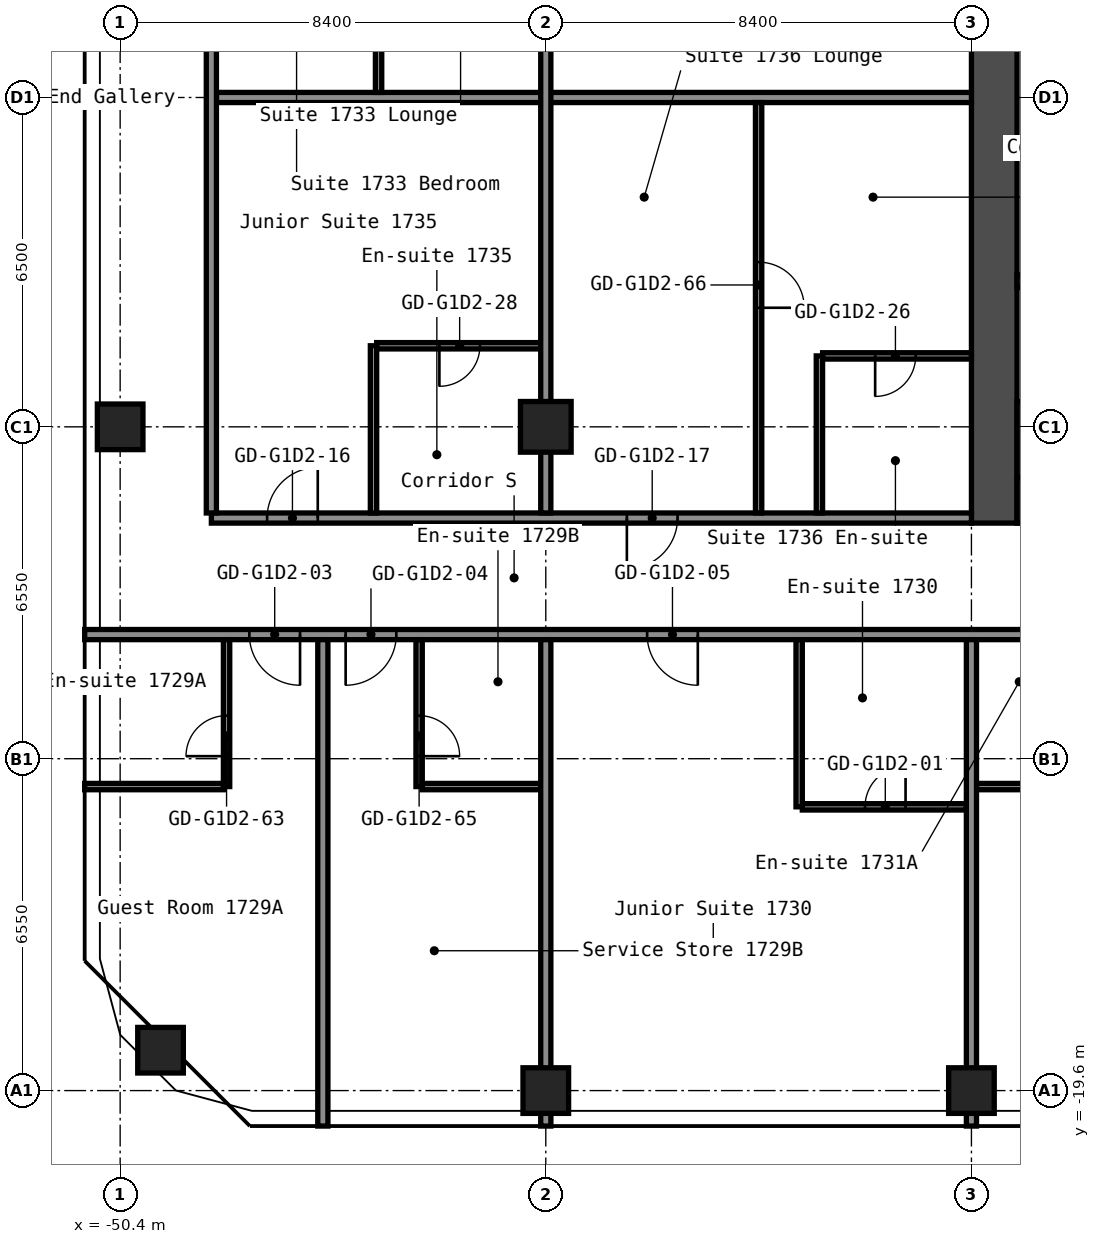
"""IFC4 building model, lengths in metres.
Left out: names, types, materials, properties, quantities, classifications, styles, units other than length and angle.
Written with IfcOpenShell. Run it as: python <this file> out.ifc"""

import sys

from ifc_helpers import new_model, si_unit, direction, frame, frame_2d, origin, origin_2d, place, context, subcontext, project, spatial, rectangle, hollow_rectangle, extrude, element, fill, save


model = new_model("IFC4")
c1 = context("Model", 3, precision=1e-05, world=origin(), true_north=direction((0.0, 1.0)))
c2 = subcontext(c1, "Body", "Model", "MODEL_VIEW")
j1 = project(units=[si_unit("LENGTHUNIT", "METRE"), si_unit("PLANEANGLEUNIT", "RADIAN")], contexts=[c1])
p1 = place(None, origin())
s1 = spatial("IfcSite", under=j1, at=p1, CompositionType="ELEMENT")
p2 = place(p1, origin())
s2 = spatial("IfcBuilding", under=s1, at=p2, CompositionType="ELEMENT")
p3 = place(p2, frame((0.0, 0.0, 61.4)))
s3 = spatial("IfcBuildingStorey", under=s2, at=p3, CompositionType="ELEMENT", Elevation=61.4)
for number, where, z_axis, x_axis in (
    (1, (-49.603, -18.803, 0.0), (0.0, 0.0, 1.0), (1.0, 0.0, 0.0)),
    (2, (-50.4, -6.5, 0.0), (0.0, 0.0, 1.0), (1.0, 0.0, 0.0)),
    (3, (-42.0, -19.6, 0.0), (0.0, 0.0, 1.0), (1.0, 0.0, 0.0)),
):
    element("IfcColumn", number, at=place(p3, frame(where, z_axis=z_axis, x_axis=x_axis)), inside=s3, PredefinedType="COLUMN", context=c2, shape_type="SweptSolid", body=[
        extrude(hollow_rectangle(XDim=0.9, YDim=0.9, WallThickness=0.036, at=origin_2d()), origin(), (0.0, 0.0, 1.0), 2.9),
    ])
p4 = place(p3, frame((-42.0, -6.5, 0.0), z_axis=(0.0, 0.0, 1.0), x_axis=(1.0, 0.0, 0.0)))
e4 = element("IfcColumn", 4, at=p4, inside=s3, PredefinedType="COLUMN", context=c2, shape_type="SweptSolid", body=[
    extrude(hollow_rectangle(XDim=1.0, YDim=1.0, WallThickness=0.04, at=origin_2d()), origin(), (0.0, 0.0, 1.0), 2.9),
])
p5 = place(p3, frame((-33.6, -19.6, 0.0), z_axis=(0.0, 0.0, 1.0), x_axis=(1.0, 0.0, 0.0)))
e5 = element("IfcColumn", 5, at=p5, inside=s3, PredefinedType="COLUMN", context=c2, shape_type="SweptSolid", body=[
    extrude(hollow_rectangle(XDim=0.9, YDim=0.9, WallThickness=0.036, at=origin_2d()), origin(), (0.0, 0.0, 1.0), 2.9),
])
p6 = place(p3, frame((-33.15, -8.4, 0.0), z_axis=(0.0, 0.0, 1.0), x_axis=(0.0, 1.0, 0.0)))
e6 = element("IfcWall", 6, at=p6, inside=s3, PredefinedType="SHEAR", context=c2, shape_type="SweptSolid", body=[
    extrude(rectangle(XDim=16.8, YDim=0.9, at=frame_2d((8.4, 0.0))), origin(), (0.0, 0.0, 1.0), 2.9),
])
p7 = place(p3, frame((-32.7, -7.95, 0.0), z_axis=(0.0, 0.0, 1.0), x_axis=(1.0, 0.0, 0.0)))
e7 = element("IfcWall", 7, at=p7, inside=s3, PredefinedType="SHEAR", context=c2, shape_type="SweptSolid", body=[
    extrude(rectangle(XDim=15.0, YDim=0.9, at=frame_2d((7.5, 0.0))), origin(), (0.0, 0.0, 1.0), 2.9),
])
p8 = place(p7, frame((11.45, 0.0, 0.0)))
e8 = element("IfcOpeningElement", 8, at=p8, cuts=e7, PredefinedType="OPENING", context=c2, shape_type="SweptSolid", body=[
    extrude(rectangle(XDim=1.0, YDim=2.1, at=frame_2d((0.5, 1.05))), frame((0.0, 0.46, 0.0), z_axis=(0.0, -1.0, 0.0), x_axis=(1.0, 0.0, 0.0)), (0.0, 0.0, 1.0), 0.92),
])
p9 = place(p3, frame((-32.7, -3.625, 0.0), z_axis=(0.0, 0.0, 1.0), x_axis=(1.0, 0.0, 0.0)))
e9 = element("IfcWall", 9, at=p9, inside=s3, PredefinedType="SHEAR", context=c2, shape_type="SweptSolid", body=[
    extrude(rectangle(XDim=4.55, YDim=0.25, at=frame_2d((2.275, 0.0))), origin(), (0.0, 0.0, 1.0), 2.9),
])
p10 = place(p9, frame((2.85, 0.0, 0.0)))
e10 = element("IfcOpeningElement", 10, at=p10, cuts=e9, PredefinedType="OPENING", context=c2, shape_type="SweptSolid", body=[
    extrude(rectangle(XDim=1.1, YDim=2.1, at=frame_2d((0.55, 1.05))), frame((0.0, 0.135, 0.0), z_axis=(0.0, -1.0, 0.0), x_axis=(1.0, 0.0, 0.0)), (0.0, 0.0, 1.0), 0.27),
])
p11 = place(p9, frame((0.6, 0.0, 0.0)))
e11 = element("IfcOpeningElement", 11, at=p11, cuts=e9, PredefinedType="OPENING", context=c2, shape_type="SweptSolid", body=[
    extrude(rectangle(XDim=1.1, YDim=2.1, at=frame_2d((0.55, 1.05))), frame((0.0, 0.135, 0.0), z_axis=(0.0, -1.0, 0.0), x_axis=(1.0, 0.0, 0.0)), (0.0, 0.0, 1.0), 0.27),
])
p12 = place(p3, frame((-32.7, -6.75, 0.0), z_axis=(0.0, 0.0, 1.0), x_axis=(1.0, 0.0, 0.0)))
e12 = element("IfcWall", 12, at=p12, inside=s3, PredefinedType="SHEAR", context=c2, shape_type="SweptSolid", body=[
    extrude(rectangle(XDim=4.55, YDim=1.5, at=frame_2d((2.275, 0.0))), origin(), (0.0, 0.0, 1.0), 2.9),
])
p13 = place(p3, frame((-36.938, -14.0, 0.0), z_axis=(0.0, 0.0, 1.0), x_axis=(1.0, 0.0, 0.0)))
e13 = element("IfcWall", 13, at=p13, inside=s3, PredefinedType="PARTITIONING", context=c2, shape_type="SweptSolid", body=[
    extrude(rectangle(XDim=3.238, YDim=0.125, at=frame_2d((1.619, 0.0))), origin(), (0.0, 0.0, 1.0), 2.9),
])
p14 = place(p13, frame((1.238, 0.0, 0.0)))
e14 = element("IfcOpeningElement", 14, at=p14, cuts=e13, PredefinedType="OPENING", context=c2, shape_type="SweptSolid", body=[
    extrude(rectangle(XDim=0.8, YDim=2.1, at=frame_2d((0.4, 1.05))), frame((0.0, 0.073, 0.0), z_axis=(0.0, -1.0, 0.0), x_axis=(1.0, 0.0, 0.0)), (0.0, 0.0, 1.0), 0.145),
])
p15 = place(p3, frame((-51.1, -13.6, 0.0), z_axis=(0.0, 0.0, 1.0), x_axis=(1.0, 0.0, 0.0)))
e15 = element("IfcWall", 15, at=p15, inside=s3, PredefinedType="PARTITIONING", context=c2, shape_type="SweptSolid", body=[
    extrude(rectangle(XDim=2.738, YDim=0.125, at=frame_2d((1.369, 0.0))), origin(), (0.0, 0.0, 1.0), 2.9),
])
for number, where, z_axis, x_axis in (
    (16, (-44.438, -13.6, 0.0), (0.0, 0.0, 1.0), (1.0, 0.0, 0.0)),
    (17, (-33.5, -13.6, 0.0), (0.0, 0.0, 1.0), (1.0, 0.0, 0.0)),
):
    element("IfcWall", number, at=place(p3, frame(where, z_axis=z_axis, x_axis=x_axis)), inside=s3, PredefinedType="PARTITIONING", context=c2, shape_type="SweptSolid", body=[
        extrude(rectangle(XDim=2.337, YDim=0.125, at=frame_2d((1.169, 0.0))), origin(), (0.0, 0.0, 1.0), 2.9),
    ])
p16 = place(p3, frame((-51.1, -10.6, 0.0), z_axis=(0.0, 0.0, 1.0), x_axis=(1.0, 0.0, 0.0)))
e18 = element("IfcWall", 18, at=p16, inside=s3, PredefinedType="PARTITIONING", context=c2, shape_type="SweptSolid", body=[
    extrude(rectangle(XDim=34.3, YDim=0.2, at=frame_2d((17.15, 0.0))), origin(), (0.0, 0.0, 1.0), 2.9),
])
p17 = place(p16, frame((3.25, 0.0, 0.0)))
e19 = element("IfcOpeningElement", 19, at=p17, cuts=e18, PredefinedType="OPENING", context=c2, shape_type="SweptSolid", body=[
    extrude(rectangle(XDim=1.0, YDim=2.1, at=frame_2d((0.5, 1.05))), frame((0.0, 0.11, 0.0), z_axis=(0.0, -1.0, 0.0), x_axis=(1.0, 0.0, 0.0)), (0.0, 0.0, 1.0), 0.22),
])
p18 = place(p16, frame((5.15, 0.0, 0.0)))
e20 = element("IfcOpeningElement", 20, at=p18, cuts=e18, PredefinedType="OPENING", context=c2, shape_type="SweptSolid", body=[
    extrude(rectangle(XDim=1.0, YDim=2.1, at=frame_2d((0.5, 1.05))), frame((0.0, 0.11, 0.0), z_axis=(0.0, -1.0, 0.0), x_axis=(1.0, 0.0, 0.0)), (0.0, 0.0, 1.0), 0.22),
])
p19 = place(p16, frame((11.1, 0.0, 0.0)))
e21 = element("IfcOpeningElement", 21, at=p19, cuts=e18, PredefinedType="OPENING", context=c2, shape_type="SweptSolid", body=[
    extrude(rectangle(XDim=1.0, YDim=2.1, at=frame_2d((0.5, 1.05))), frame((0.0, 0.11, 0.0), z_axis=(0.0, -1.0, 0.0), x_axis=(1.0, 0.0, 0.0)), (0.0, 0.0, 1.0), 0.22),
])
p20 = place(p16, frame((20.35, 0.0, 0.0)))
e22 = element("IfcOpeningElement", 22, at=p20, cuts=e18, PredefinedType="OPENING", context=c2, shape_type="SweptSolid", body=[
    extrude(rectangle(XDim=1.0, YDim=2.1, at=frame_2d((0.5, 1.05))), frame((0.0, 0.11, 0.0), z_axis=(0.0, -1.0, 0.0), x_axis=(1.0, 0.0, 0.0)), (0.0, 0.0, 1.0), 0.22),
])
p21 = place(p16, frame((22.05, 0.0, 0.0)))
e23 = element("IfcOpeningElement", 23, at=p21, cuts=e18, PredefinedType="OPENING", context=c2, shape_type="SweptSolid", body=[
    extrude(rectangle(XDim=1.0, YDim=2.1, at=frame_2d((0.5, 1.05))), frame((0.0, 0.11, 0.0), z_axis=(0.0, -1.0, 0.0), x_axis=(1.0, 0.0, 0.0)), (0.0, 0.0, 1.0), 0.22),
])
p22 = place(p16, frame((31.3, 0.0, 0.0)))
e24 = element("IfcOpeningElement", 24, at=p22, cuts=e18, PredefinedType="OPENING", context=c2, shape_type="SweptSolid", body=[
    extrude(rectangle(XDim=1.0, YDim=2.1, at=frame_2d((0.5, 1.05))), frame((0.0, 0.11, 0.0), z_axis=(0.0, -1.0, 0.0), x_axis=(1.0, 0.0, 0.0)), (0.0, 0.0, 1.0), 0.22),
])
p23 = place(p3, frame((-48.6, -8.3, 0.0), z_axis=(0.0, 0.0, 1.0), x_axis=(1.0, 0.0, 0.0)))
e25 = element("IfcWall", 25, at=p23, inside=s3, PredefinedType="PARTITIONING", context=c2, shape_type="SweptSolid", body=[
    extrude(rectangle(XDim=15.0, YDim=0.2, at=frame_2d((7.5, 0.0))), origin(), (0.0, 0.0, 1.0), 2.9),
])
p24 = place(p23, frame((1.1, 0.0, 0.0)))
e26 = element("IfcOpeningElement", 26, at=p24, cuts=e25, PredefinedType="OPENING", context=c2, shape_type="SweptSolid", body=[
    extrude(rectangle(XDim=1.0, YDim=2.1, at=frame_2d((0.5, 1.05))), frame((0.0, 0.11, 0.0), z_axis=(0.0, -1.0, 0.0), x_axis=(1.0, 0.0, 0.0)), (0.0, 0.0, 1.0), 0.22),
])
p25 = place(p23, frame((8.2, 0.0, 0.0)))
e27 = element("IfcOpeningElement", 27, at=p25, cuts=e25, PredefinedType="OPENING", context=c2, shape_type="SweptSolid", body=[
    extrude(rectangle(XDim=1.0, YDim=2.1, at=frame_2d((0.5, 1.05))), frame((0.0, 0.11, 0.0), z_axis=(0.0, -1.0, 0.0), x_axis=(1.0, 0.0, 0.0)), (0.0, 0.0, 1.0), 0.22),
])
p26 = place(p3, frame((-36.538, -5.1, 0.0), z_axis=(0.0, 0.0, 1.0), x_axis=(1.0, 0.0, 0.0)))
e28 = element("IfcWall", 28, at=p26, inside=s3, PredefinedType="PARTITIONING", context=c2, shape_type="SweptSolid", body=[
    extrude(rectangle(XDim=2.938, YDim=0.125, at=frame_2d((1.469, 0.0))), origin(), (0.0, 0.0, 1.0), 2.9),
])
p27 = place(p26, frame((1.038, 0.0, 0.0)))
e29 = element("IfcOpeningElement", 29, at=p27, cuts=e28, PredefinedType="OPENING", context=c2, shape_type="SweptSolid", body=[
    extrude(rectangle(XDim=0.8, YDim=2.1, at=frame_2d((0.4, 1.05))), frame((0.0, 0.073, 0.0), z_axis=(0.0, -1.0, 0.0), x_axis=(1.0, 0.0, 0.0)), (0.0, 0.0, 1.0), 0.145),
])
p28 = place(p3, frame((-45.337, -4.9, 0.0), z_axis=(0.0, 0.0, 1.0), x_axis=(1.0, 0.0, 0.0)))
e30 = element("IfcWall", 30, at=p28, inside=s3, PredefinedType="PARTITIONING", context=c2, shape_type="SweptSolid", body=[
    extrude(rectangle(XDim=3.237, YDim=0.125, at=frame_2d((1.619, 0.0))), origin(), (0.0, 0.0, 1.0), 2.9),
])
p29 = place(p28, frame((1.238, 0.0, 0.0)))
e31 = element("IfcOpeningElement", 31, at=p29, cuts=e30, PredefinedType="OPENING", context=c2, shape_type="SweptSolid", body=[
    extrude(rectangle(XDim=0.8, YDim=2.1, at=frame_2d((0.4, 1.05))), frame((0.0, 0.073, 0.0), z_axis=(0.0, -1.0, 0.0), x_axis=(1.0, 0.0, 0.0)), (0.0, 0.0, 1.0), 0.145),
])
p30 = place(p3, frame((-48.5, 0.0, 0.0), z_axis=(0.0, 0.0, 1.0), x_axis=(1.0, 0.0, 0.0)))
e32 = element("IfcWall", 32, at=p30, inside=s3, PredefinedType="PARTITIONING", context=c2, shape_type="SweptSolid", body=[
    extrude(rectangle(XDim=14.9, YDim=0.2, at=frame_2d((7.45, 0.0))), origin(), (0.0, 0.0, 1.0), 2.9),
])
p31 = place(p3, frame((-48.6, -8.2, 0.0), z_axis=(0.0, 0.0, 1.0), x_axis=(0.0, 1.0, 0.0)))
e33 = element("IfcWall", 33, at=p31, inside=s3, PredefinedType="PARTITIONING", context=c2, shape_type="SweptSolid", body=[
    extrude(rectangle(XDim=16.4, YDim=0.2, at=frame_2d((8.2, 0.0))), origin(), (0.0, 0.0, 1.0), 2.9),
])
p32 = place(p3, frame((-48.3, -13.6, 0.0), z_axis=(0.0, 0.0, 1.0), x_axis=(0.0, 1.0, 0.0)))
e34 = element("IfcWall", 34, at=p32, inside=s3, PredefinedType="PARTITIONING", context=c2, shape_type="SweptSolid", body=[
    extrude(rectangle(XDim=2.9, YDim=0.125, at=frame_2d((1.45, 0.0))), origin(), (0.0, 0.0, 1.0), 2.9),
])
p33 = place(p32, frame((0.6, 0.0, 0.0)))
e35 = element("IfcOpeningElement", 35, at=p33, cuts=e34, PredefinedType="OPENING", context=c2, shape_type="SweptSolid", body=[
    extrude(rectangle(XDim=0.8, YDim=2.1, at=frame_2d((0.4, 1.05))), frame((0.0, 0.073, 0.0), z_axis=(0.0, -1.0, 0.0), x_axis=(1.0, 0.0, 0.0)), (0.0, 0.0, 1.0), 0.145),
])
p34 = place(p3, frame((-46.4, -20.3, 0.0), z_axis=(0.0, 0.0, 1.0), x_axis=(0.0, 1.0, 0.0)))
e36 = element("IfcWall", 36, at=p34, inside=s3, PredefinedType="PARTITIONING", context=c2, shape_type="SweptSolid", body=[
    extrude(rectangle(XDim=9.6, YDim=0.2, at=frame_2d((4.8, 0.0))), origin(), (0.0, 0.0, 1.0), 2.9),
])
p35 = place(p3, frame((-45.4, -8.2, 0.0), z_axis=(0.0, 0.0, 1.0), x_axis=(0.0, 1.0, 0.0)))
e37 = element("IfcWall", 37, at=p35, inside=s3, PredefinedType="PARTITIONING", context=c2, shape_type="SweptSolid", body=[
    extrude(rectangle(XDim=3.3, YDim=0.125, at=frame_2d((1.65, 0.0))), origin(), (0.0, 0.0, 1.0), 2.9),
])
p36 = place(p3, frame((-45.3, 0.1, 0.0), z_axis=(0.0, 0.0, 1.0), x_axis=(0.0, 1.0, 0.0)))
e38 = element("IfcWall", 38, at=p36, inside=s3, PredefinedType="PARTITIONING", context=c2, shape_type="SweptSolid", body=[
    extrude(rectangle(XDim=8.1, YDim=0.125, at=frame_2d((4.05, 0.0))), origin(), (0.0, 0.0, 1.0), 2.9),
])
p37 = place(p36, frame((3.15, 0.0, 0.0)))
e39 = element("IfcOpeningElement", 39, at=p37, cuts=e38, PredefinedType="OPENING", context=c2, shape_type="SweptSolid", body=[
    extrude(rectangle(XDim=0.9, YDim=2.1, at=frame_2d((0.45, 1.05))), frame((0.0, 0.073, 0.0), z_axis=(0.0, -1.0, 0.0), x_axis=(1.0, 0.0, 0.0)), (0.0, 0.0, 1.0), 0.145),
])
p38 = place(p3, frame((-44.5, -13.6, 0.0), z_axis=(0.0, 0.0, 1.0), x_axis=(0.0, 1.0, 0.0)))
e40 = element("IfcWall", 40, at=p38, inside=s3, PredefinedType="PARTITIONING", context=c2, shape_type="SweptSolid", body=[
    extrude(rectangle(XDim=2.9, YDim=0.125, at=frame_2d((1.45, 0.0))), origin(), (0.0, 0.0, 1.0), 2.9),
])
p39 = place(p38, frame((0.6, 0.0, 0.0)))
e41 = element("IfcOpeningElement", 41, at=p39, cuts=e40, PredefinedType="OPENING", context=c2, shape_type="SweptSolid", body=[
    extrude(rectangle(XDim=0.8, YDim=2.1, at=frame_2d((0.4, 1.05))), frame((0.0, 0.073, 0.0), z_axis=(0.0, -1.0, 0.0), x_axis=(1.0, 0.0, 0.0)), (0.0, 0.0, 1.0), 0.145),
])
p40 = place(p3, frame((-42.0, -20.3, 0.0), z_axis=(0.0, 0.0, 1.0), x_axis=(0.0, 1.0, 0.0)))
e42 = element("IfcWall", 42, at=p40, inside=s3, PredefinedType="PARTITIONING", context=c2, shape_type="SweptSolid", body=[
    extrude(rectangle(XDim=9.6, YDim=0.2, at=frame_2d((4.8, 0.0))), origin(), (0.0, 0.0, 1.0), 2.9),
])
p41 = place(p3, frame((-42.0, -8.2, 0.0), z_axis=(0.0, 0.0, 1.0), x_axis=(0.0, 1.0, 0.0)))
e43 = element("IfcWall", 43, at=p41, inside=s3, PredefinedType="PARTITIONING", context=c2, shape_type="SweptSolid", body=[
    extrude(rectangle(XDim=16.4, YDim=0.2, at=frame_2d((8.2, 0.0))), origin(), (0.0, 0.0, 1.0), 2.9),
])
p42 = place(p3, frame((-37.8, -8.2, 0.0), z_axis=(0.0, 0.0, 1.0), x_axis=(0.0, 1.0, 0.0)))
e44 = element("IfcWall", 44, at=p42, inside=s3, PredefinedType="PARTITIONING", context=c2, shape_type="SweptSolid", body=[
    extrude(rectangle(XDim=8.1, YDim=0.125, at=frame_2d((4.05, 0.0))), origin(), (0.0, 0.0, 1.0), 2.9),
])
p43 = place(p42, frame((4.05, 0.0, 0.0)))
e45 = element("IfcOpeningElement", 45, at=p43, cuts=e44, PredefinedType="OPENING", context=c2, shape_type="SweptSolid", body=[
    extrude(rectangle(XDim=0.9, YDim=2.1, at=frame_2d((0.45, 1.05))), frame((0.0, 0.073, 0.0), z_axis=(0.0, -1.0, 0.0), x_axis=(1.0, 0.0, 0.0)), (0.0, 0.0, 1.0), 0.145),
])
p44 = place(p3, frame((-37.0, -14.0, 0.0), z_axis=(0.0, 0.0, 1.0), x_axis=(0.0, 1.0, 0.0)))
e46 = element("IfcWall", 46, at=p44, inside=s3, PredefinedType="PARTITIONING", context=c2, shape_type="SweptSolid", body=[
    extrude(rectangle(XDim=3.3, YDim=0.125, at=frame_2d((1.65, 0.0))), origin(), (0.0, 0.0, 1.0), 2.9),
])
p45 = place(p3, frame((-36.6, -8.2, 0.0), z_axis=(0.0, 0.0, 1.0), x_axis=(0.0, 1.0, 0.0)))
e47 = element("IfcWall", 47, at=p45, inside=s3, PredefinedType="PARTITIONING", context=c2, shape_type="SweptSolid", body=[
    extrude(rectangle(XDim=3.1, YDim=0.125, at=frame_2d((1.55, 0.0))), origin(), (0.0, 0.0, 1.0), 2.9),
])
p46 = place(p3, frame((-33.6, -20.3, 0.0), z_axis=(0.0, 0.0, 1.0), x_axis=(0.0, 1.0, 0.0)))
e48 = element("IfcWall", 48, at=p46, inside=s3, PredefinedType="PARTITIONING", context=c2, shape_type="SweptSolid", body=[
    extrude(rectangle(XDim=9.6, YDim=0.2, at=frame_2d((4.8, 0.0))), origin(), (0.0, 0.0, 1.0), 2.9),
])
p47 = place(p14, origin())
e49 = element("IfcDoor", 49, at=p47, inside=s3, OperationType="SINGLE_SWING_LEFT", PredefinedType="DOOR", context=c2, shape_type="SweptSolid", body=[
    extrude(rectangle(XDim=0.8, YDim=2.1, at=frame_2d((0.4, 1.05))), frame((0.0, 0.025, 0.0), z_axis=(0.0, -1.0, 0.0), x_axis=(1.0, 0.0, 0.0)), (0.0, 0.0, 1.0), 0.05),
])
fill(e14, e49)
p48 = place(p17, origin())
e50 = element("IfcDoor", 50, at=p48, inside=s3, OperationType="SINGLE_SWING_RIGHT", PredefinedType="DOOR", context=c2, shape_type="SweptSolid", body=[
    extrude(rectangle(XDim=1.0, YDim=2.1, at=frame_2d((0.5, 1.05))), frame((0.0, 0.025, 0.0), z_axis=(0.0, -1.0, 0.0), x_axis=(1.0, 0.0, 0.0)), (0.0, 0.0, 1.0), 0.05),
])
fill(e19, e50)
p49 = place(p18, origin())
e51 = element("IfcDoor", 51, at=p49, inside=s3, OperationType="SINGLE_SWING_LEFT", PredefinedType="DOOR", context=c2, shape_type="SweptSolid", body=[
    extrude(rectangle(XDim=1.0, YDim=2.1, at=frame_2d((0.5, 1.05))), frame((0.0, 0.025, 0.0), z_axis=(0.0, -1.0, 0.0), x_axis=(1.0, 0.0, 0.0)), (0.0, 0.0, 1.0), 0.05),
])
fill(e20, e51)
p50 = place(p19, origin())
e52 = element("IfcDoor", 52, at=p50, inside=s3, OperationType="SINGLE_SWING_RIGHT", PredefinedType="DOOR", context=c2, shape_type="SweptSolid", body=[
    extrude(rectangle(XDim=1.0, YDim=2.1, at=frame_2d((0.5, 1.05))), frame((0.0, 0.025, 0.0), z_axis=(0.0, -1.0, 0.0), x_axis=(1.0, 0.0, 0.0)), (0.0, 0.0, 1.0), 0.05),
])
fill(e21, e52)
p51 = place(p24, origin())
e53 = element("IfcDoor", 53, at=p51, inside=s3, OperationType="SINGLE_SWING_LEFT", PredefinedType="DOOR", context=c2, shape_type="SweptSolid", body=[
    extrude(rectangle(XDim=1.0, YDim=2.1, at=frame_2d((0.5, 1.05))), frame((0.0, 0.025, 0.0), z_axis=(0.0, -1.0, 0.0), x_axis=(1.0, 0.0, 0.0)), (0.0, 0.0, 1.0), 0.05),
])
fill(e26, e53)
p52 = place(p25, origin())
e54 = element("IfcDoor", 54, at=p52, inside=s3, OperationType="SINGLE_SWING_LEFT", PredefinedType="DOOR", context=c2, shape_type="SweptSolid", body=[
    extrude(rectangle(XDim=1.0, YDim=2.1, at=frame_2d((0.5, 1.05))), frame((0.0, 0.025, 0.0), z_axis=(0.0, -1.0, 0.0), x_axis=(1.0, 0.0, 0.0)), (0.0, 0.0, 1.0), 0.05),
])
fill(e27, e54)
p53 = place(p27, origin())
e55 = element("IfcDoor", 55, at=p53, inside=s3, OperationType="SINGLE_SWING_LEFT", PredefinedType="DOOR", context=c2, shape_type="SweptSolid", body=[
    extrude(rectangle(XDim=0.8, YDim=2.1, at=frame_2d((0.4, 1.05))), frame((0.0, 0.025, 0.0), z_axis=(0.0, -1.0, 0.0), x_axis=(1.0, 0.0, 0.0)), (0.0, 0.0, 1.0), 0.05),
])
fill(e29, e55)
p54 = place(p29, origin())
e56 = element("IfcDoor", 56, at=p54, inside=s3, OperationType="SINGLE_SWING_LEFT", PredefinedType="DOOR", context=c2, shape_type="SweptSolid", body=[
    extrude(rectangle(XDim=0.8, YDim=2.1, at=frame_2d((0.4, 1.05))), frame((0.0, 0.025, 0.0), z_axis=(0.0, -1.0, 0.0), x_axis=(1.0, 0.0, 0.0)), (0.0, 0.0, 1.0), 0.05),
])
fill(e31, e56)
p55 = place(p33, origin())
e57 = element("IfcDoor", 57, at=p55, inside=s3, OperationType="SINGLE_SWING_RIGHT", PredefinedType="DOOR", context=c2, shape_type="SweptSolid", body=[
    extrude(rectangle(XDim=0.8, YDim=2.1, at=frame_2d((0.4, 1.05))), frame((0.0, 0.025, 0.0), z_axis=(0.0, -1.0, 0.0), x_axis=(1.0, 0.0, 0.0)), (0.0, 0.0, 1.0), 0.05),
])
fill(e35, e57)
p56 = place(p39, origin())
e58 = element("IfcDoor", 58, at=p56, inside=s3, OperationType="SINGLE_SWING_LEFT", PredefinedType="DOOR", context=c2, shape_type="SweptSolid", body=[
    extrude(rectangle(XDim=0.8, YDim=2.1, at=frame_2d((0.4, 1.05))), frame((0.0, 0.025, 0.0), z_axis=(0.0, -1.0, 0.0), x_axis=(1.0, 0.0, 0.0)), (0.0, 0.0, 1.0), 0.05),
])
fill(e41, e58)
p57 = place(p43, origin())
e59 = element("IfcDoor", 59, at=p57, inside=s3, OperationType="SINGLE_SWING_LEFT", PredefinedType="DOOR", context=c2, shape_type="SweptSolid", body=[
    extrude(rectangle(XDim=0.9, YDim=2.1, at=frame_2d((0.45, 1.05))), frame((0.0, 0.025, 0.0), z_axis=(0.0, -1.0, 0.0), x_axis=(1.0, 0.0, 0.0)), (0.0, 0.0, 1.0), 0.05),
])
fill(e45, e59)
save(model, sys.argv[1])
